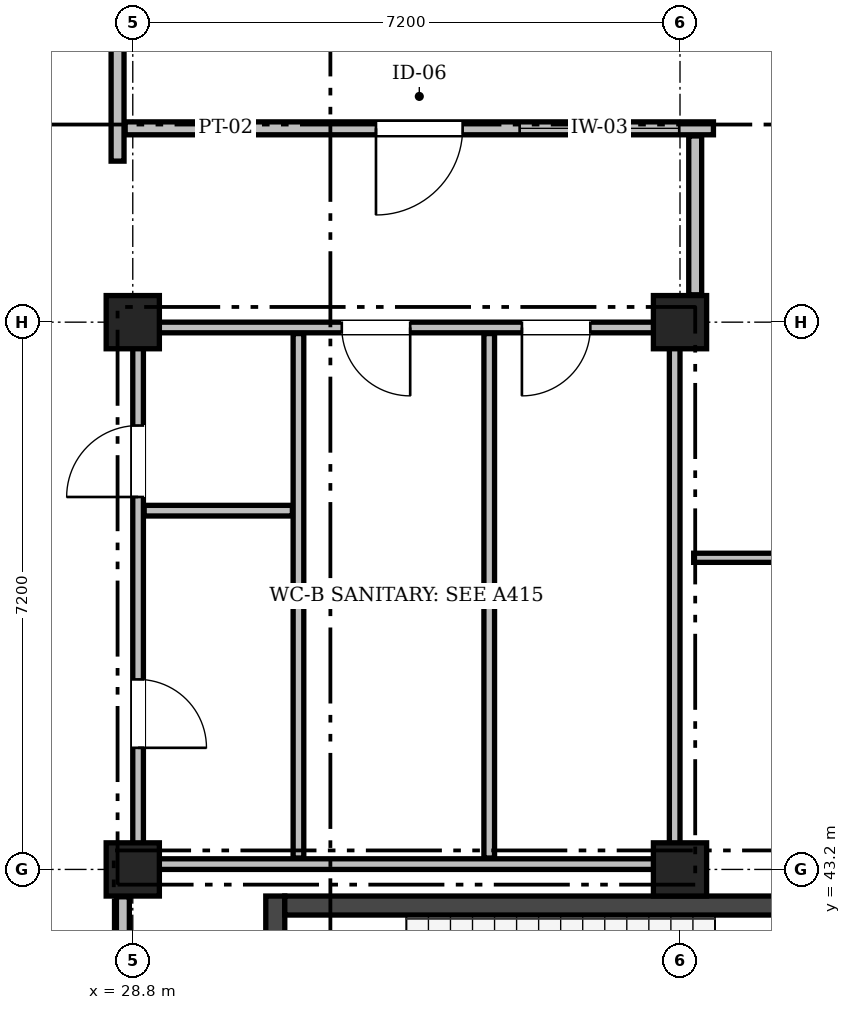
"""IFC4 building model, lengths in metres.
Left out: names, types, materials, properties, quantities, classifications, styles, units other than length and angle.
Written with IfcOpenShell. Run it as: python <this file> out.ifc"""

import sys

from ifc_helpers import new_model, si_unit, direction, frame, frame_2d, origin, origin_2d, place, context, subcontext, project, spatial, rectangle, extrude, element, fill, save


model = new_model("IFC4")
c1 = context("Model", 3, precision=1e-05, world=origin(), true_north=direction((0.0, 1.0)))
c2 = subcontext(c1, "Body", "Model", "MODEL_VIEW")
j1 = project(units=[si_unit("LENGTHUNIT", "METRE"), si_unit("PLANEANGLEUNIT", "RADIAN")], contexts=[c1])
p1 = place(None, origin())
s1 = spatial("IfcSite", under=j1, at=p1, CompositionType="ELEMENT")
p2 = place(p1, origin())
s2 = spatial("IfcBuilding", under=s1, at=p2, CompositionType="ELEMENT")
p3 = place(p2, frame((0.0, 0.0, 18.9)))
s3 = spatial("IfcBuildingStorey", under=s2, at=p3, CompositionType="ELEMENT", Elevation=18.9)
for number, where, z_axis, x_axis in (
    (1, (28.8, 43.2, 0.0), (0.0, 0.0, 1.0), (1.0, 0.0, 0.0)),
    (2, (28.8, 50.4, 0.0), (0.0, 0.0, 1.0), (1.0, 0.0, 0.0)),
    (3, (36.0, 43.2, 0.0), (0.0, 0.0, 1.0), (1.0, 0.0, 0.0)),
    (4, (36.0, 50.4, 0.0), (0.0, 0.0, 1.0), (1.0, 0.0, 0.0)),
):
    element("IfcColumn", number, at=place(p3, frame(where, z_axis=z_axis, x_axis=x_axis)), inside=s3, PredefinedType="COLUMN", context=c2, shape_type="SweptSolid", body=[
        extrude(rectangle(XDim=0.7, YDim=0.7, at=origin_2d()), origin(), (0.0, 0.0, 1.0), 4.5),
    ])
p4 = place(p3, frame((30.675, 39.15, 0.0), z_axis=(0.0, 0.0, 1.0), x_axis=(0.0, 1.0, 0.0)))
e5 = element("IfcWall", 5, at=p4, inside=s3, PredefinedType="SHEAR", context=c2, shape_type="SweptSolid", body=[
    extrude(rectangle(XDim=3.7, YDim=0.25, at=frame_2d((1.85, 0.0))), origin(), (0.0, 0.0, 1.0), 4.25),
])
p5 = place(p4, frame((1.25, 0.0, 0.0)))
e6 = element("IfcOpeningElement", 6, at=p5, cuts=e5, PredefinedType="OPENING", context=c2, shape_type="SweptSolid", body=[
    extrude(rectangle(XDim=1.2, YDim=2.15, at=frame_2d((0.6, 1.075))), frame((0.0, 0.137, 0.0), z_axis=(0.0, -1.0, 0.0), x_axis=(1.0, 0.0, 0.0)), (0.0, 0.0, 1.0), 0.274),
])
p6 = place(p3, frame((30.8, 42.725, 0.0), z_axis=(0.0, 0.0, 1.0), x_axis=(1.0, 0.0, 0.0)))
e7 = element("IfcWall", 7, at=p6, inside=s3, PredefinedType="SHEAR", context=c2, shape_type="SweptSolid", body=[
    extrude(rectangle(XDim=7.6, YDim=0.25, at=frame_2d((3.8, 0.0))), origin(), (0.0, 0.0, 1.0), 4.25),
])
p7 = place(p3, frame((28.87, 43.27, 0.0), z_axis=(0.0, 0.0, 1.0), x_axis=(1.0, 0.0, 0.0)))
e8 = element("IfcWall", 8, at=p7, inside=s3, PredefinedType="PARTITIONING", context=c2, shape_type="SweptSolid", body=[
    extrude(rectangle(XDim=7.06, YDim=0.14, at=frame_2d((3.53, 0.0))), origin(), (0.0, 0.0, 1.0), 3.73),
])
p8 = place(p3, frame((28.87, 50.33, 0.0), z_axis=(0.0, 0.0, 1.0), x_axis=(1.0, 0.0, 0.0)))
e9 = element("IfcWall", 9, at=p8, inside=s3, PredefinedType="PARTITIONING", context=c2, shape_type="SweptSolid", body=[
    extrude(rectangle(XDim=7.06, YDim=0.14, at=frame_2d((3.53, 0.0))), origin(), (0.0, 0.0, 1.0), 3.73),
])
p9 = place(p8, frame((2.68, 0.0, 0.0)))
e10 = element("IfcOpeningElement", 10, at=p9, cuts=e9, PredefinedType="OPENING", context=c2, shape_type="SweptSolid", body=[
    extrude(rectangle(XDim=0.9, YDim=2.08, at=frame_2d((0.45, 1.04))), frame((0.0, 0.082, 0.0), z_axis=(0.0, -1.0, 0.0), x_axis=(1.0, 0.0, 0.0)), (0.0, 0.0, 1.0), 0.164),
])
p10 = place(p8, frame((5.05, 0.0, 0.0)))
e11 = element("IfcOpeningElement", 11, at=p10, cuts=e9, PredefinedType="OPENING", context=c2, shape_type="SweptSolid", body=[
    extrude(rectangle(XDim=0.9, YDim=2.08, at=frame_2d((0.45, 1.04))), frame((0.0, 0.082, 0.0), z_axis=(0.0, -1.0, 0.0), x_axis=(1.0, 0.0, 0.0)), (0.0, 0.0, 1.0), 0.164),
])
p11 = place(p3, frame((28.87, 43.35, 0.0), z_axis=(0.0, 0.0, 1.0), x_axis=(0.0, 1.0, 0.0)))
e12 = element("IfcWall", 12, at=p11, inside=s3, PredefinedType="PARTITIONING", context=c2, shape_type="SweptSolid", body=[
    extrude(rectangle(XDim=6.9, YDim=0.14, at=frame_2d((3.45, 0.0))), origin(), (0.0, 0.0, 1.0), 3.73),
])
p12 = place(p11, frame((1.45, 0.0, 0.0)))
e13 = element("IfcOpeningElement", 13, at=p12, cuts=e12, PredefinedType="OPENING", context=c2, shape_type="SweptSolid", body=[
    extrude(rectangle(XDim=0.9, YDim=2.08, at=frame_2d((0.45, 1.04))), frame((0.0, 0.082, 0.0), z_axis=(0.0, -1.0, 0.0), x_axis=(1.0, 0.0, 0.0)), (0.0, 0.0, 1.0), 0.164),
])
p13 = place(p11, frame((4.75, 0.0, 0.0)))
e14 = element("IfcOpeningElement", 14, at=p13, cuts=e12, PredefinedType="OPENING", context=c2, shape_type="SweptSolid", body=[
    extrude(rectangle(XDim=0.94, YDim=2.1, at=frame_2d((0.47, 1.05))), frame((0.0, 0.082, 0.0), z_axis=(0.0, -1.0, 0.0), x_axis=(1.0, 0.0, 0.0)), (0.0, 0.0, 1.0), 0.164),
])
p14 = place(p3, frame((35.93, 43.35, 0.0), z_axis=(0.0, 0.0, 1.0), x_axis=(0.0, 1.0, 0.0)))
e15 = element("IfcWall", 15, at=p14, inside=s3, PredefinedType="PARTITIONING", context=c2, shape_type="SweptSolid", body=[
    extrude(rectangle(XDim=6.9, YDim=0.14, at=frame_2d((3.45, 0.0))), origin(), (0.0, 0.0, 1.0), 3.73),
])
for number, where, z_axis, x_axis in (
    (16, (30.98, 43.35, 0.0), (0.0, 0.0, 1.0), (0.0, 1.0, 0.0)),
    (17, (33.49, 43.35, 0.0), (0.0, 0.0, 1.0), (0.0, 1.0, 0.0)),
):
    element("IfcWall", number, at=place(p3, frame(where, z_axis=z_axis, x_axis=x_axis)), inside=s3, PredefinedType="PARTITIONING", context=c2, shape_type="SweptSolid", body=[
        extrude(rectangle(XDim=6.9, YDim=0.14, at=frame_2d((3.45, 0.0))), origin(), (0.0, 0.0, 1.0), 4.16),
    ])
p15 = place(p3, frame((28.95, 47.92, 0.0), z_axis=(0.0, 0.0, 1.0), x_axis=(1.0, 0.0, 0.0)))
e18 = element("IfcWall", 18, at=p15, inside=s3, PredefinedType="PARTITIONING", context=c2, shape_type="SweptSolid", body=[
    extrude(rectangle(XDim=1.95, YDim=0.14, at=frame_2d((0.975, 0.0))), origin(), (0.0, 0.0, 1.0), 4.16),
])
p16 = place(p3, frame((28.67, 36.36, 0.0), z_axis=(0.0, 0.0, 1.0), x_axis=(0.0, 1.0, 0.0)))
e19 = element("IfcWall", 19, at=p16, inside=s3, PredefinedType="PARTITIONING", context=c2, shape_type="SweptSolid", body=[
    extrude(rectangle(XDim=6.48, YDim=0.17, at=frame_2d((3.24, 0.0))), origin(), (0.0, 0.0, 1.0), 3.73),
])
p17 = place(p16, frame((2.53, 0.0, 0.0)))
e20 = element("IfcOpeningElement", 20, at=p17, cuts=e19, PredefinedType="OPENING", context=c2, shape_type="SweptSolid", body=[
    extrude(rectangle(XDim=1.42, YDim=2.24, at=frame_2d((0.71, 1.12))), frame((0.0, 0.097, 0.0), z_axis=(0.0, -1.0, 0.0), x_axis=(1.0, 0.0, 0.0)), (0.0, 0.0, 1.0), 0.194),
])
p18 = place(p3, frame((28.6, 52.519, 0.0), z_axis=(0.0, 0.0, 1.0), x_axis=(0.0, 1.0, 0.0)))
e21 = element("IfcWall", 21, at=p18, inside=s3, PredefinedType="PARTITIONING", context=c2, shape_type="SweptSolid", body=[
    extrude(rectangle(XDim=4.721, YDim=0.17, at=frame_2d((2.361, 0.0))), origin(), (0.0, 0.0, 1.0), 3.73),
])
p19 = place(p3, frame((28.7, 52.95, 0.0), z_axis=(0.0, 0.0, 1.0), x_axis=(1.0, 0.0, 0.0)))
e22 = element("IfcWall", 22, at=p19, inside=s3, PredefinedType="PARTITIONING", context=c2, shape_type="SweptSolid", body=[
    extrude(rectangle(XDim=7.74, YDim=0.17, at=frame_2d((3.87, 0.0))), origin(), (0.0, 0.0, 1.0), 4.16),
])
p20 = place(p19, frame((3.3, 0.0, 0.0)))
e23 = element("IfcOpeningElement", 23, at=p20, cuts=e22, PredefinedType="OPENING", context=c2, shape_type="SweptSolid", body=[
    extrude(rectangle(XDim=1.14, YDim=2.2, at=frame_2d((0.57, 1.1))), frame((0.0, 0.097, 0.0), z_axis=(0.0, -1.0, 0.0), x_axis=(1.0, 0.0, 0.0)), (0.0, 0.0, 1.0), 0.194),
])
p21 = place(p19, frame((5.19, 0.0, 1.05)))
e24 = element("IfcOpeningElement", 24, at=p21, cuts=e22, PredefinedType="OPENING", context=c2, shape_type="SweptSolid", body=[
    extrude(rectangle(XDim=2.1, YDim=1.05, at=frame_2d((1.05, 0.525))), frame((0.0, 0.097, 0.0), z_axis=(0.0, -1.0, 0.0), x_axis=(1.0, 0.0, 0.0)), (0.0, 0.0, 1.0), 0.194),
])
p22 = place(p3, frame((36.2, 50.76, 0.0), z_axis=(0.0, 0.0, 1.0), x_axis=(0.0, 1.0, 0.0)))
e25 = element("IfcWall", 25, at=p22, inside=s3, PredefinedType="PARTITIONING", context=c2, shape_type="SweptSolid", body=[
    extrude(rectangle(XDim=2.09, YDim=0.17, at=frame_2d((1.045, 0.0))), origin(), (0.0, 0.0, 1.0), 3.73),
])
p23 = place(p3, frame((36.18, 47.3, 0.0), z_axis=(0.0, 0.0, 1.0), x_axis=(1.0, 0.0, 0.0)))
e26 = element("IfcWall", 26, at=p23, inside=s3, PredefinedType="PARTITIONING", context=c2, shape_type="SweptSolid", body=[
    extrude(rectangle(XDim=3.665, YDim=0.12, at=frame_2d((1.833, 0.0))), origin(), (0.0, 0.0, 1.0), 4.16),
])
p24 = place(p12, frame((0.9, 0.0, 0.0), z_axis=(0.0, 0.0, 1.0), x_axis=(-1.0, 0.0, 0.0)))
e27 = element("IfcDoor", 27, at=p24, inside=s3, OperationType="SINGLE_SWING_RIGHT", PredefinedType="DOOR", context=c2, shape_type="SweptSolid", body=[
    extrude(rectangle(XDim=0.9, YDim=2.08, at=frame_2d((0.45, 1.04))), frame((0.0, 0.025, 0.0), z_axis=(0.0, -1.0, 0.0), x_axis=(1.0, 0.0, 0.0)), (0.0, 0.0, 1.0), 0.05),
])
fill(e13, e27)
p25 = place(p13, origin())
e28 = element("IfcDoor", 28, at=p25, inside=s3, OperationType="SINGLE_SWING_LEFT", PredefinedType="DOOR", context=c2, shape_type="SweptSolid", body=[
    extrude(rectangle(XDim=0.94, YDim=2.1, at=frame_2d((0.47, 1.05))), frame((0.0, 0.025, 0.0), z_axis=(0.0, -1.0, 0.0), x_axis=(1.0, 0.0, 0.0)), (0.0, 0.0, 1.0), 0.05),
])
fill(e14, e28)
p26 = place(p9, frame((0.9, 0.0, 0.0), z_axis=(0.0, 0.0, 1.0), x_axis=(-1.0, 0.0, 0.0)))
e29 = element("IfcDoor", 29, at=p26, inside=s3, OperationType="SINGLE_SWING_LEFT", PredefinedType="DOOR", context=c2, shape_type="SweptSolid", body=[
    extrude(rectangle(XDim=0.9, YDim=2.08, at=frame_2d((0.45, 1.04))), frame((0.0, 0.025, 0.0), z_axis=(0.0, -1.0, 0.0), x_axis=(1.0, 0.0, 0.0)), (0.0, 0.0, 1.0), 0.05),
])
fill(e10, e29)
p27 = place(p10, frame((0.9, 0.0, 0.0), z_axis=(0.0, 0.0, 1.0), x_axis=(-1.0, 0.0, 0.0)))
e30 = element("IfcDoor", 30, at=p27, inside=s3, OperationType="SINGLE_SWING_RIGHT", PredefinedType="DOOR", context=c2, shape_type="SweptSolid", body=[
    extrude(rectangle(XDim=0.9, YDim=2.08, at=frame_2d((0.45, 1.04))), frame((0.0, 0.025, 0.0), z_axis=(0.0, -1.0, 0.0), x_axis=(1.0, 0.0, 0.0)), (0.0, 0.0, 1.0), 0.05),
])
fill(e11, e30)
p28 = place(p20, frame((1.14, 0.0, 0.0), z_axis=(0.0, 0.0, 1.0), x_axis=(-1.0, 0.0, 0.0)))
e31 = element("IfcDoor", 31, at=p28, inside=s3, OperationType="SINGLE_SWING_RIGHT", PredefinedType="DOOR", context=c2, shape_type="SweptSolid", body=[
    extrude(rectangle(XDim=1.14, YDim=2.2, at=frame_2d((0.57, 1.1))), frame((0.0, 0.025, 0.0), z_axis=(0.0, -1.0, 0.0), x_axis=(1.0, 0.0, 0.0)), (0.0, 0.0, 1.0), 0.05),
])
fill(e23, e31)
p29 = place(p21, origin())
e32 = element("IfcWindow", 32, at=p29, inside=s3, PartitioningType="SINGLE_PANEL", PredefinedType="WINDOW", context=c2, shape_type="SweptSolid", body=[
    extrude(rectangle(XDim=2.1, YDim=1.05, at=frame_2d((1.05, 0.525))), frame((0.0, 0.03, 0.0), z_axis=(0.0, -1.0, 0.0), x_axis=(1.0, 0.0, 0.0)), (0.0, 0.0, 1.0), 0.06),
])
fill(e24, e32)
save(model, sys.argv[1])
